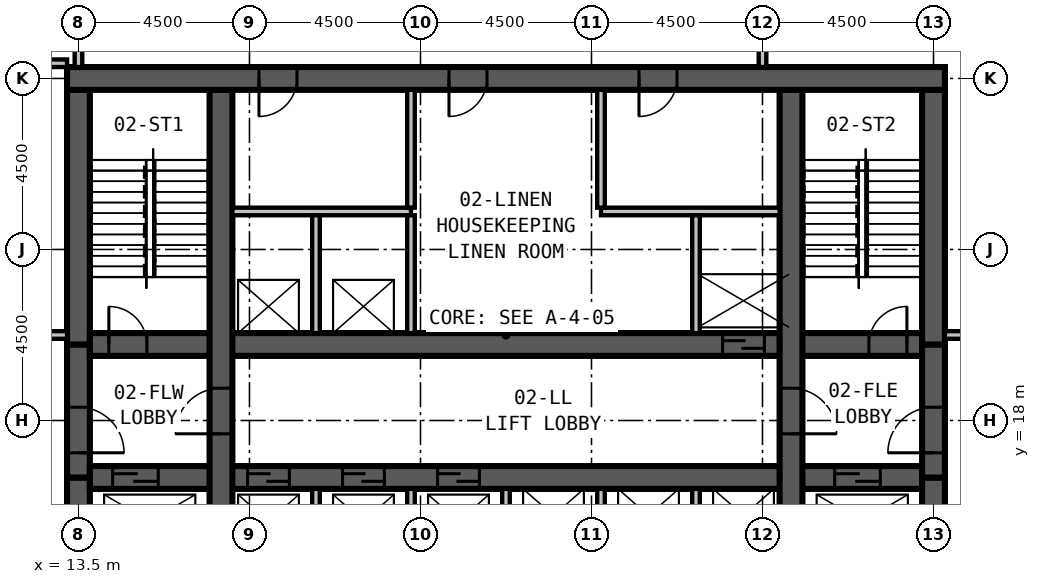
"""IFC4 building model, lengths in metres.
Left out: names, types, materials, properties, quantities, classifications, styles, units other than length and angle.
Written with IfcOpenShell. Run it as: python <this file> out.ifc"""

import sys

from ifc_helpers import new_model, si_unit, direction, frame, frame_2d, origin, place, context, subcontext, project, spatial, rectangle, extrude, element, fill, save


model = new_model("IFC4")
c1 = context("Model", 3, precision=1e-05, world=origin(), true_north=direction((0.0, 1.0)))
c2 = subcontext(c1, "Body", "Model", "MODEL_VIEW")
j1 = project(units=[si_unit("LENGTHUNIT", "METRE"), si_unit("PLANEANGLEUNIT", "RADIAN")], contexts=[c1])
p1 = place(None, origin())
s1 = spatial("IfcSite", under=j1, at=p1, CompositionType="ELEMENT")
p2 = place(p1, origin())
s2 = spatial("IfcBuilding", under=s1, at=p2, CompositionType="ELEMENT")
p3 = place(p2, frame((0.0, 0.0, 11.0)))
s3 = spatial("IfcBuildingStorey", under=s2, at=p3, CompositionType="ELEMENT", Elevation=11.0)
p4 = place(p3, frame((36.3, 27.0, 0.0), z_axis=(0.0, 0.0, 1.0), x_axis=(-1.0, 0.0, 0.0)))
e1 = element("IfcWall", 1, at=p4, inside=s3, PredefinedType="SHEAR", context=c2, shape_type="SweptSolid", body=[
    extrude(rectangle(XDim=23.1, YDim=0.6, at=frame_2d((11.55, 0.0))), origin(), (0.0, 0.0, 1.0), 8.0),
])
p5 = place(p4, frame((17.05, 0.0, 0.0)))
e2 = element("IfcOpeningElement", 2, at=p5, cuts=e1, PredefinedType="OPENING", context=c2, shape_type="SweptSolid", body=[
    extrude(rectangle(XDim=1.0, YDim=2.1, at=frame_2d((0.5, 1.05))), frame((0.0, 0.31, 0.0), z_axis=(0.0, -1.0, 0.0), x_axis=(1.0, 0.0, 0.0)), (0.0, 0.0, 1.0), 0.62),
])
p6 = place(p4, frame((12.05, 0.0, 0.0)))
e3 = element("IfcOpeningElement", 3, at=p6, cuts=e1, PredefinedType="OPENING", context=c2, shape_type="SweptSolid", body=[
    extrude(rectangle(XDim=1.0, YDim=2.1, at=frame_2d((0.5, 1.05))), frame((0.0, 0.31, 0.0), z_axis=(0.0, -1.0, 0.0), x_axis=(1.0, 0.0, 0.0)), (0.0, 0.0, 1.0), 0.62),
])
p7 = place(p4, frame((7.05, 0.0, 0.0)))
e4 = element("IfcOpeningElement", 4, at=p7, cuts=e1, PredefinedType="OPENING", context=c2, shape_type="SweptSolid", body=[
    extrude(rectangle(XDim=1.0, YDim=2.1, at=frame_2d((0.5, 1.05))), frame((0.0, 0.31, 0.0), z_axis=(0.0, -1.0, 0.0), x_axis=(1.0, 0.0, 0.0)), (0.0, 0.0, 1.0), 0.62),
])
p8 = place(p3, frame((17.25, 13.8, 0.0), z_axis=(0.0, 0.0, 1.0), x_axis=(0.0, 1.0, 0.0)))
e5 = element("IfcWall", 5, at=p8, inside=s3, PredefinedType="SHEAR", context=c2, shape_type="SweptSolid", body=[
    extrude(rectangle(XDim=12.9, YDim=0.6, at=frame_2d((6.45, 0.0))), origin(), (0.0, 0.0, 1.0), 8.0),
])
p9 = place(p8, frame((3.85, 0.0, 0.0)))
e6 = element("IfcOpeningElement", 6, at=p9, cuts=e5, PredefinedType="OPENING", context=c2, shape_type="SweptSolid", body=[
    extrude(rectangle(XDim=1.2, YDim=2.1, at=frame_2d((0.6, 1.05))), frame((0.0, 0.31, 0.0), z_axis=(0.0, -1.0, 0.0), x_axis=(1.0, 0.0, 0.0)), (0.0, 0.0, 1.0), 0.62),
])
p10 = place(p3, frame((32.25, 13.8, 0.0), z_axis=(0.0, 0.0, 1.0), x_axis=(0.0, 1.0, 0.0)))
e7 = element("IfcWall", 7, at=p10, inside=s3, PredefinedType="SHEAR", context=c2, shape_type="SweptSolid", body=[
    extrude(rectangle(XDim=12.9, YDim=0.6, at=frame_2d((6.45, 0.0))), origin(), (0.0, 0.0, 1.0), 8.0),
])
p11 = place(p10, frame((5.05, 0.0, 0.0), z_axis=(0.0, 0.0, 1.0), x_axis=(-1.0, 0.0, 0.0)))
e8 = element("IfcOpeningElement", 8, at=p11, cuts=e7, PredefinedType="OPENING", context=c2, shape_type="SweptSolid", body=[
    extrude(rectangle(XDim=1.2, YDim=2.1, at=frame_2d((0.6, 1.05))), frame((0.0, 0.31, 0.0), z_axis=(0.0, -1.0, 0.0), x_axis=(1.0, 0.0, 0.0)), (0.0, 0.0, 1.0), 0.62),
])
p12 = place(p3, frame((13.8, 16.5, 0.0), z_axis=(0.0, 0.0, 1.0), x_axis=(1.0, 0.0, 0.0)))
e9 = element("IfcWall", 9, at=p12, inside=s3, PredefinedType="SHEAR", context=c2, shape_type="SweptSolid", body=[
    extrude(rectangle(XDim=21.9, YDim=0.6, at=frame_2d((10.95, 0.0))), origin(), (0.0, 0.0, 1.0), 8.0),
])
p13 = place(p12, frame((4.15, 0.0, 0.0)))
e10 = element("IfcOpeningElement", 10, at=p13, cuts=e9, PredefinedType="OPENING", context=c2, shape_type="SweptSolid", body=[
    extrude(rectangle(XDim=1.1, YDim=2.1, at=frame_2d((0.55, 1.05))), frame((0.0, 0.31, 0.0), z_axis=(0.0, -1.0, 0.0), x_axis=(1.0, 0.0, 0.0)), (0.0, 0.0, 1.0), 0.62),
])
p14 = place(p12, frame((6.65, 0.0, 0.0)))
e11 = element("IfcOpeningElement", 11, at=p14, cuts=e9, PredefinedType="OPENING", context=c2, shape_type="SweptSolid", body=[
    extrude(rectangle(XDim=1.1, YDim=2.1, at=frame_2d((0.55, 1.05))), frame((0.0, 0.31, 0.0), z_axis=(0.0, -1.0, 0.0), x_axis=(1.0, 0.0, 0.0)), (0.0, 0.0, 1.0), 0.62),
])
p15 = place(p12, frame((9.15, 0.0, 0.0)))
e12 = element("IfcOpeningElement", 12, at=p15, cuts=e9, PredefinedType="OPENING", context=c2, shape_type="SweptSolid", body=[
    extrude(rectangle(XDim=1.1, YDim=2.1, at=frame_2d((0.55, 1.05))), frame((0.0, 0.31, 0.0), z_axis=(0.0, -1.0, 0.0), x_axis=(1.0, 0.0, 0.0)), (0.0, 0.0, 1.0), 0.62),
])
p16 = place(p12, frame((0.6, 0.0, 0.0)))
e13 = element("IfcOpeningElement", 13, at=p16, cuts=e9, PredefinedType="OPENING", context=c2, shape_type="SweptSolid", body=[
    extrude(rectangle(XDim=1.2, YDim=2.1, at=frame_2d((0.6, 1.05))), frame((0.0, 0.31, 0.0), z_axis=(0.0, -1.0, 0.0), x_axis=(1.0, 0.0, 0.0)), (0.0, 0.0, 1.0), 0.62),
])
p17 = place(p12, frame((19.6, 0.0, 0.0)))
e14 = element("IfcOpeningElement", 14, at=p17, cuts=e9, PredefinedType="OPENING", context=c2, shape_type="SweptSolid", body=[
    extrude(rectangle(XDim=1.2, YDim=2.1, at=frame_2d((0.6, 1.05))), frame((0.0, 0.31, 0.0), z_axis=(0.0, -1.0, 0.0), x_axis=(1.0, 0.0, 0.0)), (0.0, 0.0, 1.0), 0.62),
])
p18 = place(p3, frame((13.8, 20.0, 0.0), z_axis=(0.0, 0.0, 1.0), x_axis=(1.0, 0.0, 0.0)))
e15 = element("IfcWall", 15, at=p18, inside=s3, PredefinedType="SHEAR", context=c2, shape_type="SweptSolid", body=[
    extrude(rectangle(XDim=21.9, YDim=0.6, at=frame_2d((10.95, 0.0))), origin(), (0.0, 0.0, 1.0), 8.0),
])
p19 = place(p18, frame((0.5, 0.0, 0.0)))
e16 = element("IfcOpeningElement", 16, at=p19, cuts=e15, PredefinedType="OPENING", context=c2, shape_type="SweptSolid", body=[
    extrude(rectangle(XDim=1.0, YDim=2.1, at=frame_2d((0.5, 1.05))), frame((0.0, 0.31, 0.0), z_axis=(0.0, -1.0, 0.0), x_axis=(1.0, 0.0, 0.0)), (0.0, 0.0, 1.0), 0.62),
])
p20 = place(p18, frame((20.5, 0.0, 0.0)))
e17 = element("IfcOpeningElement", 17, at=p20, cuts=e15, PredefinedType="OPENING", context=c2, shape_type="SweptSolid", body=[
    extrude(rectangle(XDim=1.0, YDim=2.1, at=frame_2d((0.5, 1.05))), frame((0.0, 0.31, 0.0), z_axis=(0.0, -1.0, 0.0), x_axis=(1.0, 0.0, 0.0)), (0.0, 0.0, 1.0), 0.62),
])
p21 = place(p18, frame((16.65, 0.0, 0.0)))
e18 = element("IfcOpeningElement", 18, at=p21, cuts=e15, PredefinedType="OPENING", context=c2, shape_type="SweptSolid", body=[
    extrude(rectangle(XDim=1.1, YDim=2.1, at=frame_2d((0.55, 1.05))), frame((0.0, 0.31, 0.0), z_axis=(0.0, -1.0, 0.0), x_axis=(1.0, 0.0, 0.0)), (0.0, 0.0, 1.0), 0.62),
])
p22 = place(p3, frame((13.5, 26.7, 0.0), z_axis=(0.0, 0.0, 1.0), x_axis=(0.0, -1.0, 0.0)))
e19 = element("IfcWall", 19, at=p22, inside=s3, PredefinedType="SHEAR", context=c2, shape_type="SweptSolid", body=[
    extrude(rectangle(XDim=6.7, YDim=0.6, at=frame_2d((3.35, 0.0))), origin(), (0.0, 0.0, 1.0), 8.0),
])
p23 = place(p3, frame((13.5, 20.0, 0.0), z_axis=(0.0, 0.0, 1.0), x_axis=(0.0, -1.0, 0.0)))
e20 = element("IfcWall", 20, at=p23, inside=s3, PredefinedType="SHEAR", context=c2, shape_type="SweptSolid", body=[
    extrude(rectangle(XDim=3.5, YDim=0.6, at=frame_2d((1.75, 0.0))), origin(), (0.0, 0.0, 1.0), 8.0),
])
p24 = place(p23, frame((1.65, 0.0, 0.0)))
e21 = element("IfcOpeningElement", 21, at=p24, cuts=e20, PredefinedType="OPENING", context=c2, shape_type="SweptSolid", body=[
    extrude(rectangle(XDim=1.2, YDim=2.1, at=frame_2d((0.6, 1.05))), frame((0.0, 0.31, 0.0), z_axis=(0.0, -1.0, 0.0), x_axis=(1.0, 0.0, 0.0)), (0.0, 0.0, 1.0), 0.62),
])
for number, where, z_axis, x_axis in (
    (22, (13.5, 16.5, 0.0), (0.0, 0.0, 1.0), (0.0, -1.0, 0.0)),
    (23, (36.0, 13.8, 0.0), (0.0, 0.0, 1.0), (0.0, 1.0, 0.0)),
):
    element("IfcWall", number, at=place(p3, frame(where, z_axis=z_axis, x_axis=x_axis)), inside=s3, PredefinedType="SHEAR", context=c2, shape_type="SweptSolid", body=[
        extrude(rectangle(XDim=2.7, YDim=0.6, at=frame_2d((1.35, 0.0))), origin(), (0.0, 0.0, 1.0), 8.0),
    ])
p25 = place(p3, frame((36.0, 16.5, 0.0), z_axis=(0.0, 0.0, 1.0), x_axis=(0.0, 1.0, 0.0)))
e24 = element("IfcWall", 24, at=p25, inside=s3, PredefinedType="SHEAR", context=c2, shape_type="SweptSolid", body=[
    extrude(rectangle(XDim=3.5, YDim=0.6, at=frame_2d((1.75, 0.0))), origin(), (0.0, 0.0, 1.0), 8.0),
])
p26 = place(p25, frame((0.65, 0.0, 0.0)))
e25 = element("IfcOpeningElement", 25, at=p26, cuts=e24, PredefinedType="OPENING", context=c2, shape_type="SweptSolid", body=[
    extrude(rectangle(XDim=1.2, YDim=2.1, at=frame_2d((0.6, 1.05))), frame((0.0, 0.31, 0.0), z_axis=(0.0, -1.0, 0.0), x_axis=(1.0, 0.0, 0.0)), (0.0, 0.0, 1.0), 0.62),
])
p27 = place(p3, frame((36.0, 20.0, 0.0), z_axis=(0.0, 0.0, 1.0), x_axis=(0.0, 1.0, 0.0)))
e26 = element("IfcWall", 26, at=p27, inside=s3, PredefinedType="SHEAR", context=c2, shape_type="SweptSolid", body=[
    extrude(rectangle(XDim=6.7, YDim=0.6, at=frame_2d((3.35, 0.0))), origin(), (0.0, 0.0, 1.0), 8.0),
])
p28 = place(p3, frame((-0.9, 20.25, 0.0), z_axis=(0.0, 0.0, 1.0), x_axis=(1.0, 0.0, 0.0)))
e27 = element("IfcWall", 27, at=p28, inside=s3, PredefinedType="PARTITIONING", context=c2, shape_type="SweptSolid", body=[
    extrude(rectangle(XDim=14.1, YDim=0.2, at=frame_2d((7.05, 0.0))), origin(), (0.0, 0.0, 1.0), 7.7),
])
p29 = place(p28, frame((7.7, 0.0, 0.0), z_axis=(0.0, 0.0, 1.0), x_axis=(-1.0, 0.0, 0.0)))
e28 = element("IfcOpeningElement", 28, at=p29, cuts=e27, PredefinedType="OPENING", context=c2, shape_type="SweptSolid", body=[
    extrude(rectangle(XDim=1.8, YDim=2.4, at=frame_2d((0.9, 1.2))), frame((0.0, 0.11, 0.0), z_axis=(0.0, -1.0, 0.0), x_axis=(1.0, 0.0, 0.0)), (0.0, 0.0, 1.0), 0.22),
])
p30 = place(p3, frame((36.3, 20.25, 0.0), z_axis=(0.0, 0.0, 1.0), x_axis=(1.0, 0.0, 0.0)))
e29 = element("IfcWall", 29, at=p30, inside=s3, PredefinedType="PARTITIONING", context=c2, shape_type="SweptSolid", body=[
    extrude(rectangle(XDim=13.2, YDim=0.2, at=frame_2d((6.6, 0.0))), origin(), (0.0, 0.0, 1.0), 7.7),
])
p31 = place(p30, frame((4.0, 0.0, 0.0)))
e30 = element("IfcOpeningElement", 30, at=p31, cuts=e29, PredefinedType="OPENING", context=c2, shape_type="SweptSolid", body=[
    extrude(rectangle(XDim=1.8, YDim=2.4, at=frame_2d((0.9, 1.2))), frame((0.0, 0.11, 0.0), z_axis=(0.0, -1.0, 0.0), x_axis=(1.0, 0.0, 0.0)), (0.0, 0.0, 1.0), 0.22),
])
p32 = place(p3, frame((7.6, 27.4, 0.0), z_axis=(0.0, 0.0, 1.0), x_axis=(1.0, 0.0, 0.0)))
e31 = element("IfcWall", 31, at=p32, inside=s3, PredefinedType="PARTITIONING", context=c2, shape_type="SweptSolid", body=[
    extrude(rectangle(XDim=5.6, YDim=0.2, at=frame_2d((2.8, 0.0))), origin(), (0.0, 0.0, 1.0), 6.4),
])
p33 = place(p3, frame((13.5, 27.3, 0.0), z_axis=(0.0, 0.0, 1.0), x_axis=(0.0, 1.0, 0.0)))
e32 = element("IfcWall", 32, at=p33, inside=s3, PredefinedType="PARTITIONING", context=c2, shape_type="SweptSolid", body=[
    extrude(rectangle(XDim=11.8, YDim=0.2, at=frame_2d((5.9, 0.0))), origin(), (0.0, 0.0, 1.0), 6.7),
])
p34 = place(p33, frame((1.65, 0.0, 0.0), z_axis=(0.0, 0.0, 1.0), x_axis=(-1.0, 0.0, 0.0)))
e33 = element("IfcOpeningElement", 33, at=p34, cuts=e32, PredefinedType="OPENING", context=c2, shape_type="SweptSolid", body=[
    extrude(rectangle(XDim=1.2, YDim=2.1, at=frame_2d((0.6, 1.05))), frame((0.0, 0.11, 0.0), z_axis=(0.0, -1.0, 0.0), x_axis=(1.0, 0.0, 0.0)), (0.0, 0.0, 1.0), 0.22),
])
p35 = place(p33, frame((10.2, 0.0, 0.0)))
e34 = element("IfcOpeningElement", 34, at=p35, cuts=e32, PredefinedType="OPENING", context=c2, shape_type="SweptSolid", body=[
    extrude(rectangle(XDim=1.0, YDim=2.1, at=frame_2d((0.5, 1.05))), frame((0.0, 0.11, 0.0), z_axis=(0.0, -1.0, 0.0), x_axis=(1.0, 0.0, 0.0)), (0.0, 0.0, 1.0), 0.22),
])
p36 = place(p3, frame((31.5, 27.3, 0.0), z_axis=(0.0, 0.0, 1.0), x_axis=(0.0, 1.0, 0.0)))
e35 = element("IfcWall", 35, at=p36, inside=s3, PredefinedType="PARTITIONING", context=c2, shape_type="SweptSolid", body=[
    extrude(rectangle(XDim=11.8, YDim=0.2, at=frame_2d((5.9, 0.0))), origin(), (0.0, 0.0, 1.0), 6.7),
])
p37 = place(p36, frame((3.0, 0.0, 0.0)))
e36 = element("IfcOpeningElement", 36, at=p37, cuts=e35, PredefinedType="OPENING", context=c2, shape_type="SweptSolid", body=[
    extrude(rectangle(XDim=1.8, YDim=2.4, at=frame_2d((0.9, 1.2))), frame((0.0, 0.11, 0.0), z_axis=(0.0, -1.0, 0.0), x_axis=(1.0, 0.0, 0.0)), (0.0, 0.0, 1.0), 0.22),
])
p38 = place(p3, frame((19.75, 13.8, 0.0), z_axis=(0.0, 0.0, 1.0), x_axis=(0.0, 1.0, 0.0)))
e37 = element("IfcWall", 37, at=p38, inside=s3, PredefinedType="PARTITIONING", context=c2, shape_type="SweptSolid", body=[
    extrude(rectangle(XDim=2.4, YDim=0.2, at=frame_2d((1.2, 0.0))), origin(), (0.0, 0.0, 1.0), 7.7),
])
p39 = place(p3, frame((19.75, 20.3, 0.0), z_axis=(0.0, 0.0, 1.0), x_axis=(0.0, 1.0, 0.0)))
e38 = element("IfcWall", 38, at=p39, inside=s3, PredefinedType="PARTITIONING", context=c2, shape_type="SweptSolid", body=[
    extrude(rectangle(XDim=3.1, YDim=0.2, at=frame_2d((1.55, 0.0))), origin(), (0.0, 0.0, 1.0), 7.7),
])
p40 = place(p3, frame((22.25, 13.8, 0.0), z_axis=(0.0, 0.0, 1.0), x_axis=(0.0, 1.0, 0.0)))
e39 = element("IfcWall", 39, at=p40, inside=s3, PredefinedType="PARTITIONING", context=c2, shape_type="SweptSolid", body=[
    extrude(rectangle(XDim=2.4, YDim=0.2, at=frame_2d((1.2, 0.0))), origin(), (0.0, 0.0, 1.0), 7.7),
])
p41 = place(p3, frame((22.25, 20.3, 0.0), z_axis=(0.0, 0.0, 1.0), x_axis=(0.0, 1.0, 0.0)))
e40 = element("IfcWall", 40, at=p41, inside=s3, PredefinedType="PARTITIONING", context=c2, shape_type="SweptSolid", body=[
    extrude(rectangle(XDim=3.1, YDim=0.2, at=frame_2d((1.55, 0.0))), origin(), (0.0, 0.0, 1.0), 7.7),
])
for number, where, z_axis, x_axis in (
    (41, (24.75, 13.8, 0.0), (0.0, 0.0, 1.0), (0.0, 1.0, 0.0)),
    (42, (27.25, 13.8, 0.0), (0.0, 0.0, 1.0), (0.0, 1.0, 0.0)),
    (43, (29.75, 13.8, 0.0), (0.0, 0.0, 1.0), (0.0, 1.0, 0.0)),
):
    element("IfcWall", number, at=place(p3, frame(where, z_axis=z_axis, x_axis=x_axis)), inside=s3, PredefinedType="PARTITIONING", context=c2, shape_type="SweptSolid", body=[
        extrude(rectangle(XDim=2.4, YDim=0.2, at=frame_2d((1.2, 0.0))), origin(), (0.0, 0.0, 1.0), 7.7),
    ])
p42 = place(p3, frame((29.75, 20.3, 0.0), z_axis=(0.0, 0.0, 1.0), x_axis=(0.0, 1.0, 0.0)))
e44 = element("IfcWall", 44, at=p42, inside=s3, PredefinedType="PARTITIONING", context=c2, shape_type="SweptSolid", body=[
    extrude(rectangle(XDim=3.1, YDim=0.2, at=frame_2d((1.55, 0.0))), origin(), (0.0, 0.0, 1.0), 7.7),
])
for number, where, z_axis, x_axis in (
    (45, (17.55, 23.5, 0.0), (0.0, 0.0, 1.0), (1.0, 0.0, 0.0)),
    (46, (27.25, 23.5, 0.0), (0.0, 0.0, 1.0), (1.0, 0.0, 0.0)),
):
    element("IfcWall", number, at=place(p3, frame(where, z_axis=z_axis, x_axis=x_axis)), inside=s3, PredefinedType="PARTITIONING", context=c2, shape_type="SweptSolid", body=[
        extrude(rectangle(XDim=4.7, YDim=0.2, at=frame_2d((2.35, 0.0))), origin(), (0.0, 0.0, 1.0), 7.7),
    ])
for number, where, z_axis, x_axis in (
    (47, (22.25, 23.6, 0.0), (0.0, 0.0, 1.0), (0.0, 1.0, 0.0)),
    (48, (27.25, 23.6, 0.0), (0.0, 0.0, 1.0), (0.0, 1.0, 0.0)),
):
    element("IfcWall", number, at=place(p3, frame(where, z_axis=z_axis, x_axis=x_axis)), inside=s3, PredefinedType="PARTITIONING", context=c2, shape_type="SweptSolid", body=[
        extrude(rectangle(XDim=3.1, YDim=0.2, at=frame_2d((1.55, 0.0))), origin(), (0.0, 0.0, 1.0), 7.7),
    ])
p43 = place(p24, origin())
e49 = element("IfcDoor", 49, at=p43, inside=s3, OperationType="SINGLE_SWING_RIGHT", PredefinedType="DOOR", context=c2, shape_type="SweptSolid", body=[
    extrude(rectangle(XDim=1.2, YDim=2.1, at=frame_2d((0.6, 1.05))), frame((0.0, 0.3, 0.0), z_axis=(0.0, -1.0, 0.0), x_axis=(1.0, 0.0, 0.0)), (0.0, 0.0, 1.0), 0.6),
])
fill(e21, e49)
p44 = place(p26, origin())
e50 = element("IfcDoor", 50, at=p44, inside=s3, OperationType="SINGLE_SWING_LEFT", PredefinedType="DOOR", context=c2, shape_type="SweptSolid", body=[
    extrude(rectangle(XDim=1.2, YDim=2.1, at=frame_2d((0.6, 1.05))), frame((0.0, 0.3, 0.0), z_axis=(0.0, -1.0, 0.0), x_axis=(1.0, 0.0, 0.0)), (0.0, 0.0, 1.0), 0.6),
])
fill(e25, e50)
p45 = place(p9, origin())
e51 = element("IfcDoor", 51, at=p45, inside=s3, OperationType="SINGLE_SWING_LEFT", PredefinedType="DOOR", context=c2, shape_type="SweptSolid", body=[
    extrude(rectangle(XDim=1.2, YDim=2.1, at=frame_2d((0.6, 1.05))), frame((0.0, 0.3, 0.0), z_axis=(0.0, -1.0, 0.0), x_axis=(1.0, 0.0, 0.0)), (0.0, 0.0, 1.0), 0.6),
])
fill(e6, e51)
p46 = place(p11, origin())
e52 = element("IfcDoor", 52, at=p46, inside=s3, OperationType="SINGLE_SWING_RIGHT", PredefinedType="DOOR", context=c2, shape_type="SweptSolid", body=[
    extrude(rectangle(XDim=1.2, YDim=2.1, at=frame_2d((0.6, 1.05))), frame((0.0, 0.3, 0.0), z_axis=(0.0, -1.0, 0.0), x_axis=(1.0, 0.0, 0.0)), (0.0, 0.0, 1.0), 0.6),
])
fill(e8, e52)
p47 = place(p19, origin())
e53 = element("IfcDoor", 53, at=p47, inside=s3, OperationType="SINGLE_SWING_LEFT", PredefinedType="DOOR", context=c2, shape_type="SweptSolid", body=[
    extrude(rectangle(XDim=1.0, YDim=2.1, at=frame_2d((0.5, 1.05))), frame((0.0, 0.3, 0.0), z_axis=(0.0, -1.0, 0.0), x_axis=(1.0, 0.0, 0.0)), (0.0, 0.0, 1.0), 0.6),
])
fill(e16, e53)
p48 = place(p20, origin())
e54 = element("IfcDoor", 54, at=p48, inside=s3, OperationType="SINGLE_SWING_RIGHT", PredefinedType="DOOR", context=c2, shape_type="SweptSolid", body=[
    extrude(rectangle(XDim=1.0, YDim=2.1, at=frame_2d((0.5, 1.05))), frame((0.0, 0.3, 0.0), z_axis=(0.0, -1.0, 0.0), x_axis=(1.0, 0.0, 0.0)), (0.0, 0.0, 1.0), 0.6),
])
fill(e17, e54)
p49 = place(p13, origin())
e55 = element("IfcDoor", 55, at=p49, inside=s3, OperationType="SLIDING_TO_LEFT", PredefinedType="DOOR", context=c2, shape_type="SweptSolid", body=[
    extrude(rectangle(XDim=1.1, YDim=2.1, at=frame_2d((0.55, 1.05))), frame((0.0, 0.3, 0.0), z_axis=(0.0, -1.0, 0.0), x_axis=(1.0, 0.0, 0.0)), (0.0, 0.0, 1.0), 0.6),
])
fill(e10, e55)
p50 = place(p14, origin())
e56 = element("IfcDoor", 56, at=p50, inside=s3, OperationType="SLIDING_TO_LEFT", PredefinedType="DOOR", context=c2, shape_type="SweptSolid", body=[
    extrude(rectangle(XDim=1.1, YDim=2.1, at=frame_2d((0.55, 1.05))), frame((0.0, 0.3, 0.0), z_axis=(0.0, -1.0, 0.0), x_axis=(1.0, 0.0, 0.0)), (0.0, 0.0, 1.0), 0.6),
])
fill(e11, e56)
p51 = place(p15, origin())
e57 = element("IfcDoor", 57, at=p51, inside=s3, OperationType="SLIDING_TO_LEFT", PredefinedType="DOOR", context=c2, shape_type="SweptSolid", body=[
    extrude(rectangle(XDim=1.1, YDim=2.1, at=frame_2d((0.55, 1.05))), frame((0.0, 0.3, 0.0), z_axis=(0.0, -1.0, 0.0), x_axis=(1.0, 0.0, 0.0)), (0.0, 0.0, 1.0), 0.6),
])
fill(e12, e57)
p52 = place(p21, origin())
e58 = element("IfcDoor", 58, at=p52, inside=s3, OperationType="SLIDING_TO_LEFT", PredefinedType="DOOR", context=c2, shape_type="SweptSolid", body=[
    extrude(rectangle(XDim=1.1, YDim=2.1, at=frame_2d((0.55, 1.05))), frame((0.0, 0.3, 0.0), z_axis=(0.0, -1.0, 0.0), x_axis=(1.0, 0.0, 0.0)), (0.0, 0.0, 1.0), 0.6),
])
fill(e18, e58)
p53 = place(p16, origin())
e59 = element("IfcDoor", 59, at=p53, inside=s3, OperationType="SLIDING_TO_LEFT", PredefinedType="DOOR", context=c2, shape_type="SweptSolid", body=[
    extrude(rectangle(XDim=1.2, YDim=2.1, at=frame_2d((0.6, 1.05))), frame((0.0, 0.3, 0.0), z_axis=(0.0, -1.0, 0.0), x_axis=(1.0, 0.0, 0.0)), (0.0, 0.0, 1.0), 0.6),
])
fill(e13, e59)
p54 = place(p17, origin())
e60 = element("IfcDoor", 60, at=p54, inside=s3, OperationType="SLIDING_TO_LEFT", PredefinedType="DOOR", context=c2, shape_type="SweptSolid", body=[
    extrude(rectangle(XDim=1.2, YDim=2.1, at=frame_2d((0.6, 1.05))), frame((0.0, 0.3, 0.0), z_axis=(0.0, -1.0, 0.0), x_axis=(1.0, 0.0, 0.0)), (0.0, 0.0, 1.0), 0.6),
])
fill(e14, e60)
p55 = place(p5, origin())
e61 = element("IfcDoor", 61, at=p55, inside=s3, OperationType="SINGLE_SWING_RIGHT", PredefinedType="DOOR", context=c2, shape_type="SweptSolid", body=[
    extrude(rectangle(XDim=1.0, YDim=2.1, at=frame_2d((0.5, 1.05))), frame((0.0, 0.3, 0.0), z_axis=(0.0, -1.0, 0.0), x_axis=(1.0, 0.0, 0.0)), (0.0, 0.0, 1.0), 0.6),
])
fill(e2, e61)
p56 = place(p6, origin())
e62 = element("IfcDoor", 62, at=p56, inside=s3, OperationType="SINGLE_SWING_RIGHT", PredefinedType="DOOR", context=c2, shape_type="SweptSolid", body=[
    extrude(rectangle(XDim=1.0, YDim=2.1, at=frame_2d((0.5, 1.05))), frame((0.0, 0.3, 0.0), z_axis=(0.0, -1.0, 0.0), x_axis=(1.0, 0.0, 0.0)), (0.0, 0.0, 1.0), 0.6),
])
fill(e3, e62)
p57 = place(p7, origin())
e63 = element("IfcDoor", 63, at=p57, inside=s3, OperationType="SINGLE_SWING_RIGHT", PredefinedType="DOOR", context=c2, shape_type="SweptSolid", body=[
    extrude(rectangle(XDim=1.0, YDim=2.1, at=frame_2d((0.5, 1.05))), frame((0.0, 0.3, 0.0), z_axis=(0.0, -1.0, 0.0), x_axis=(1.0, 0.0, 0.0)), (0.0, 0.0, 1.0), 0.6),
])
fill(e4, e63)
save(model, sys.argv[1])
